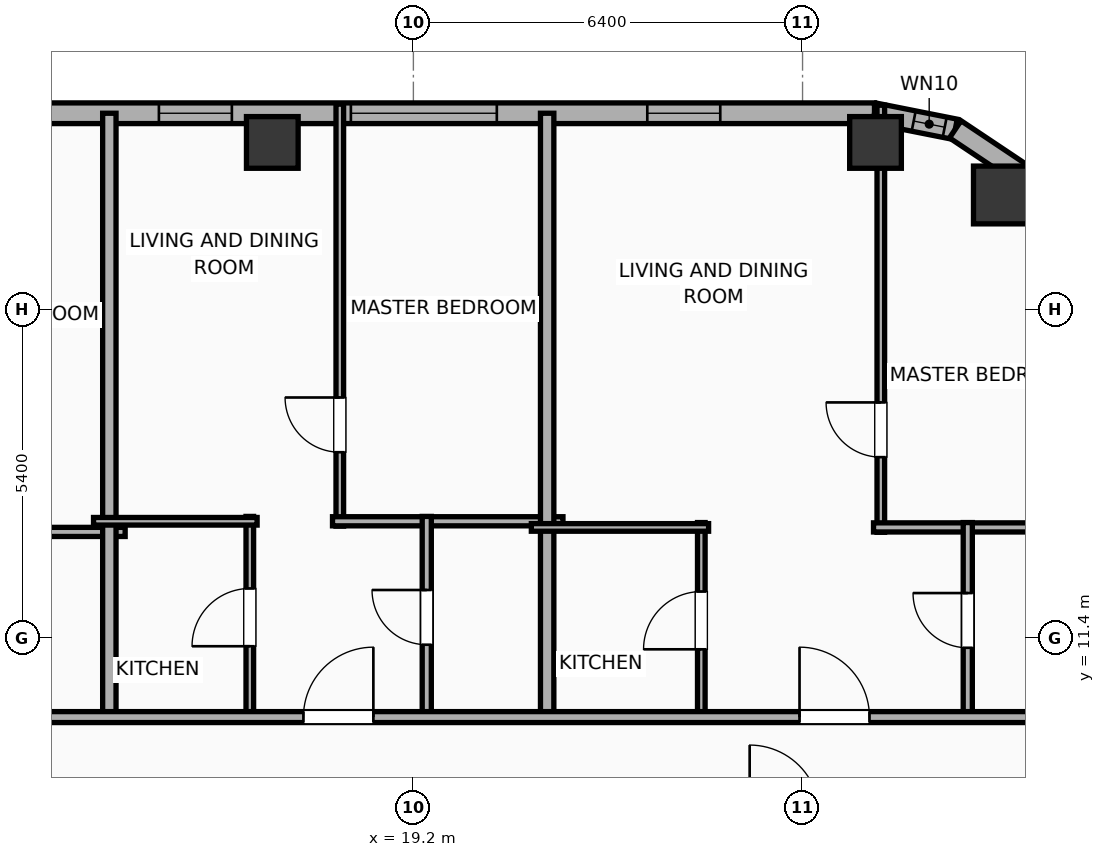
"""IFC4 building model, lengths in metres.
Left out: names, types, materials, properties, quantities, classifications, styles, units other than length and angle.
Written with IfcOpenShell. Run it as: python <this file> out.ifc"""

import sys

from ifc_helpers import new_model, si_unit, direction, frame, frame_2d, origin, origin_2d, place, context, subcontext, project, spatial, rectangle, hollow_rectangle, hollow_circle, extrude, element, fill, save


model = new_model("IFC4")
c1 = context("Model", 3, precision=1e-05, world=origin(), true_north=direction((0.0, 1.0)))
c2 = subcontext(c1, "Body", "Model", "MODEL_VIEW")
j1 = project(units=[si_unit("LENGTHUNIT", "METRE"), si_unit("PLANEANGLEUNIT", "RADIAN")], contexts=[c1])
p1 = place(None, origin())
s1 = spatial("IfcSite", under=j1, at=p1, CompositionType="ELEMENT")
p2 = place(p1, origin())
s2 = spatial("IfcBuilding", under=s1, at=p2, CompositionType="ELEMENT")
p3 = place(p2, frame((0.0, 0.0, 235.3)))
s3 = spatial("IfcBuildingStorey", under=s2, at=p3, CompositionType="ELEMENT", Elevation=235.3)
p4 = place(p3, frame((28.886, 18.686, 0.0), z_axis=(0.0, 0.0, 1.0), x_axis=(1.0, 0.0, 0.0)))
e1 = element("IfcColumn", 1, at=p4, inside=s3, PredefinedType="COLUMN", context=c2, shape_type="SweptSolid", body=[
    extrude(hollow_circle(Radius=0.475, WallThickness=0.032, at=origin_2d()), origin(), (0.0, 0.0, 1.0), 3.9),
])
for number, where, z_axis, x_axis in (
    (2, (26.8, 19.55, 0.0), (0.0, 0.0, 1.0), (1.0, 0.0, 0.0)),
    (3, (16.88, 19.55, 0.0), (0.0, 0.0, 1.0), (1.0, 0.0, 0.0)),
):
    element("IfcColumn", number, at=place(p3, frame(where, z_axis=z_axis, x_axis=x_axis)), inside=s3, PredefinedType="COLUMN", context=c2, shape_type="SweptSolid", body=[
        extrude(hollow_rectangle(XDim=0.85, YDim=0.85, WallThickness=0.028, at=origin_2d()), origin(), (0.0, 0.0, 1.0), 3.9),
    ])
p5 = place(p3, frame((-22.783, 20.03, 0.0), z_axis=(0.0, 0.0, 1.0), x_axis=(1.0, 0.0, 0.0)))
e4 = element("IfcWall", 4, at=p5, inside=s3, PredefinedType="ELEMENTEDWALL", context=c2, shape_type="SweptSolid", body=[
    extrude(rectangle(XDim=49.566, YDim=0.34, at=frame_2d((24.783, 0.0))), origin(), (0.0, 0.0, 1.0), 3.65),
])
p6 = place(p5, frame((23.583, 0.0, 0.75)))
e5 = element("IfcOpeningElement", 5, at=p6, cuts=e4, PredefinedType="OPENING", context=c2, shape_type="SweptSolid", body=[
    extrude(rectangle(XDim=2.4, YDim=2.1, at=frame_2d((1.2, 1.05))), frame((0.0, 0.18, 0.0), z_axis=(0.0, -1.0, 0.0), x_axis=(1.0, 0.0, 0.0)), (0.0, 0.0, 1.0), 0.36),
])
p7 = place(p5, frame((40.956, 0.0, 0.75)))
e6 = element("IfcOpeningElement", 6, at=p7, cuts=e4, PredefinedType="OPENING", context=c2, shape_type="SweptSolid", body=[
    extrude(rectangle(XDim=2.4, YDim=2.1, at=frame_2d((1.2, 1.05))), frame((0.0, 0.18, 0.0), z_axis=(0.0, -1.0, 0.0), x_axis=(1.0, 0.0, 0.0)), (0.0, 0.0, 1.0), 0.36),
])
p8 = place(p5, frame((5.078, 0.0, 0.75)))
e7 = element("IfcOpeningElement", 7, at=p8, cuts=e4, PredefinedType="OPENING", context=c2, shape_type="SweptSolid", body=[
    extrude(rectangle(XDim=1.2, YDim=2.05, at=frame_2d((0.6, 1.025))), frame((0.0, 0.18, 0.0), z_axis=(0.0, -1.0, 0.0), x_axis=(1.0, 0.0, 0.0)), (0.0, 0.0, 1.0), 0.36),
])
p9 = place(p5, frame((8.058, 0.0, 0.75)))
e8 = element("IfcOpeningElement", 8, at=p9, cuts=e4, PredefinedType="OPENING", context=c2, shape_type="SweptSolid", body=[
    extrude(rectangle(XDim=1.2, YDim=2.05, at=frame_2d((0.6, 1.025))), frame((0.0, 0.18, 0.0), z_axis=(0.0, -1.0, 0.0), x_axis=(1.0, 0.0, 0.0)), (0.0, 0.0, 1.0), 0.36),
])
p10 = place(p5, frame((12.478, 0.0, 0.75)))
e9 = element("IfcOpeningElement", 9, at=p10, cuts=e4, PredefinedType="OPENING", context=c2, shape_type="SweptSolid", body=[
    extrude(rectangle(XDim=1.2, YDim=2.05, at=frame_2d((0.6, 1.025))), frame((0.0, 0.18, 0.0), z_axis=(0.0, -1.0, 0.0), x_axis=(1.0, 0.0, 0.0)), (0.0, 0.0, 1.0), 0.36),
])
p11 = place(p5, frame((16.178, 0.0, 0.75)))
e10 = element("IfcOpeningElement", 10, at=p11, cuts=e4, PredefinedType="OPENING", context=c2, shape_type="SweptSolid", body=[
    extrude(rectangle(XDim=1.2, YDim=2.05, at=frame_2d((0.6, 1.025))), frame((0.0, 0.18, 0.0), z_axis=(0.0, -1.0, 0.0), x_axis=(1.0, 0.0, 0.0)), (0.0, 0.0, 1.0), 0.36),
])
p12 = place(p5, frame((20.478, 0.0, 0.75)))
e11 = element("IfcOpeningElement", 11, at=p12, cuts=e4, PredefinedType="OPENING", context=c2, shape_type="SweptSolid", body=[
    extrude(rectangle(XDim=1.2, YDim=2.05, at=frame_2d((0.6, 1.025))), frame((0.0, 0.18, 0.0), z_axis=(0.0, -1.0, 0.0), x_axis=(1.0, 0.0, 0.0)), (0.0, 0.0, 1.0), 0.36),
])
p13 = place(p5, frame((27.278, 0.0, 0.75)))
e12 = element("IfcOpeningElement", 12, at=p13, cuts=e4, PredefinedType="OPENING", context=c2, shape_type="SweptSolid", body=[
    extrude(rectangle(XDim=1.2, YDim=2.05, at=frame_2d((0.6, 1.025))), frame((0.0, 0.18, 0.0), z_axis=(0.0, -1.0, 0.0), x_axis=(1.0, 0.0, 0.0)), (0.0, 0.0, 1.0), 0.36),
])
p14 = place(p5, frame((30.978, 0.0, 0.75)))
e13 = element("IfcOpeningElement", 13, at=p14, cuts=e4, PredefinedType="OPENING", context=c2, shape_type="SweptSolid", body=[
    extrude(rectangle(XDim=1.2, YDim=2.05, at=frame_2d((0.6, 1.025))), frame((0.0, 0.18, 0.0), z_axis=(0.0, -1.0, 0.0), x_axis=(1.0, 0.0, 0.0)), (0.0, 0.0, 1.0), 0.36),
])
p15 = place(p5, frame((34.678, 0.0, 0.75)))
e14 = element("IfcOpeningElement", 14, at=p15, cuts=e4, PredefinedType="OPENING", context=c2, shape_type="SweptSolid", body=[
    extrude(rectangle(XDim=1.2, YDim=2.05, at=frame_2d((0.6, 1.025))), frame((0.0, 0.18, 0.0), z_axis=(0.0, -1.0, 0.0), x_axis=(1.0, 0.0, 0.0)), (0.0, 0.0, 1.0), 0.36),
])
p16 = place(p5, frame((37.798, 0.0, 0.75)))
e15 = element("IfcOpeningElement", 15, at=p16, cuts=e4, PredefinedType="OPENING", context=c2, shape_type="SweptSolid", body=[
    extrude(rectangle(XDim=1.2, YDim=2.05, at=frame_2d((0.6, 1.025))), frame((0.0, 0.18, 0.0), z_axis=(0.0, -1.0, 0.0), x_axis=(1.0, 0.0, 0.0)), (0.0, 0.0, 1.0), 0.36),
])
p17 = place(p5, frame((45.83, 0.0, 0.75)))
e16 = element("IfcOpeningElement", 16, at=p17, cuts=e4, PredefinedType="OPENING", context=c2, shape_type="SweptSolid", body=[
    extrude(rectangle(XDim=1.2, YDim=2.05, at=frame_2d((0.6, 1.025))), frame((0.0, 0.18, 0.0), z_axis=(0.0, -1.0, 0.0), x_axis=(1.0, 0.0, 0.0)), (0.0, 0.0, 1.0), 0.36),
])
p18 = place(p3, frame((26.783, 20.03, 0.0), z_axis=(0.0, 0.0, 1.0), x_axis=(0.980788153188, -0.195075878998, 0.0)))
e17 = element("IfcWall", 17, at=p18, inside=s3, PredefinedType="ELEMENTEDWALL", context=c2, shape_type="SweptSolid", body=[
    extrude(rectangle(XDim=1.354, YDim=0.34, at=frame_2d((0.677, 0.0))), origin(), (0.0, 0.0, 1.0), 3.65),
])
p19 = place(p18, frame((0.657, 0.0, 0.75)))
e18 = element("IfcOpeningElement", 18, at=p19, cuts=e17, PredefinedType="OPENING", context=c2, shape_type="SweptSolid", body=[
    extrude(rectangle(XDim=0.52, YDim=2.05, at=frame_2d((0.26, 1.025))), frame((0.0, 0.18, 0.0), z_axis=(0.0, -1.0, 0.0), x_axis=(1.0, 0.0, 0.0)), (0.0, 0.0, 1.0), 0.36),
])
for number, where, z_axis, x_axis in (
    (19, (28.111, 19.766, 0.0), (0.0, 0.0, 1.0), (0.831, -0.556, 0.0)),
    (20, (29.223, 19.023, 0.0), (0.0, 0.0, 1.0), (0.556, -0.831, 0.0)),
):
    element("IfcWall", number, at=place(p3, frame(where, z_axis=z_axis, x_axis=x_axis)), inside=s3, PredefinedType="ELEMENTEDWALL", context=c2, shape_type="SweptSolid", body=[
        extrude(rectangle(XDim=1.337, YDim=0.34, at=frame_2d((0.668, 0.0))), origin(), (0.0, 0.0, 1.0), 3.65),
    ])
p20 = place(p3, frame((10.67, 13.145, 0.0), z_axis=(0.0, 0.0, 1.0), x_axis=(1.0, 0.0, 0.0)))
e21 = element("IfcWall", 21, at=p20, inside=s3, PredefinedType="PLUMBINGWALL", context=c2, shape_type="SweptSolid", body=[
    extrude(rectangle(XDim=3.79, YDim=0.15, at=frame_2d((1.895, 0.0))), origin(), (0.0, 0.0, 1.0), 3.65),
])
p21 = place(p3, frame((14.2, 10.02, 0.0), z_axis=(0.0, 0.0, 1.0), x_axis=(0.0, 1.0, 0.0)))
e22 = element("IfcWall", 22, at=p21, inside=s3, PredefinedType="PARTITIONING", context=c2, shape_type="SweptSolid", body=[
    extrude(rectangle(XDim=10.01, YDim=0.22, at=frame_2d((5.005, 0.0))), origin(), (0.0, 0.0, 1.0), 3.65),
])
p22 = place(p3, frame((17.99, 13.24, 0.0), z_axis=(0.0, 0.0, 1.0), x_axis=(0.0, 1.0, 0.0)))
e23 = element("IfcWall", 23, at=p22, inside=s3, PredefinedType="PARTITIONING", context=c2, shape_type="SweptSolid", body=[
    extrude(rectangle(XDim=6.94, YDim=0.125, at=frame_2d((3.47, 0.0))), origin(), (0.0, 0.0, 1.0), 3.65),
])
p23 = place(p22, frame((1.216, 0.0, 0.0)))
e24 = element("IfcOpeningElement", 24, at=p23, cuts=e23, PredefinedType="OPENING", context=c2, shape_type="SweptSolid", body=[
    extrude(rectangle(XDim=0.9, YDim=2.05, at=frame_2d((0.45, 1.025))), frame((0.0, 0.073, 0.0), z_axis=(0.0, -1.0, 0.0), x_axis=(1.0, 0.0, 0.0)), (0.0, 0.0, 1.0), 0.145),
])
p24 = place(p3, frame((17.87, 13.32, 0.0), z_axis=(0.0, 0.0, 1.0), x_axis=(1.0, 0.0, 0.0)))
e25 = element("IfcWall", 25, at=p24, inside=s3, PredefinedType="PLUMBINGWALL", context=c2, shape_type="SweptSolid", body=[
    extrude(rectangle(XDim=3.79, YDim=0.15, at=frame_2d((1.895, 0.0))), origin(), (0.0, 0.0, 1.0), 3.65),
])
p25 = place(p3, frame((16.51, 10.08, 0.0), z_axis=(0.0, 0.0, 1.0), x_axis=(0.0, 1.0, 0.0)))
e26 = element("IfcWall", 26, at=p25, inside=s3, PredefinedType="PARTITIONING", context=c2, shape_type="SweptSolid", body=[
    extrude(rectangle(XDim=3.32, YDim=0.125, at=frame_2d((1.66, 0.0))), origin(), (0.0, 0.0, 1.0), 3.65),
])
p26 = place(p25, frame((1.185, 0.0, 0.0)))
e27 = element("IfcOpeningElement", 27, at=p26, cuts=e26, PredefinedType="OPENING", context=c2, shape_type="SweptSolid", body=[
    extrude(rectangle(XDim=0.95, YDim=2.05, at=frame_2d((0.475, 1.025))), frame((0.0, 0.073, 0.0), z_axis=(0.0, -1.0, 0.0), x_axis=(1.0, 0.0, 0.0)), (0.0, 0.0, 1.0), 0.145),
])
p27 = place(p3, frame((13.94, 13.32, 0.0), z_axis=(0.0, 0.0, 1.0), x_axis=(1.0, 0.0, 0.0)))
e28 = element("IfcWall", 28, at=p27, inside=s3, PredefinedType="PARTITIONING", context=c2, shape_type="SweptSolid", body=[
    extrude(rectangle(XDim=2.69, YDim=0.125, at=frame_2d((1.345, 0.0))), origin(), (0.0, 0.0, 1.0), 3.65),
])
p28 = place(p3, frame((19.42, 10.08, 0.0), z_axis=(0.0, 0.0, 1.0), x_axis=(0.0, 1.0, 0.0)))
e29 = element("IfcWall", 29, at=p28, inside=s3, PredefinedType="PLUMBINGWALL", context=c2, shape_type="SweptSolid", body=[
    extrude(rectangle(XDim=3.32, YDim=0.15, at=frame_2d((1.66, 0.0))), origin(), (0.0, 0.0, 1.0), 3.65),
])
p29 = place(p28, frame((1.21, 0.0, 0.0)))
e30 = element("IfcOpeningElement", 30, at=p29, cuts=e29, PredefinedType="OPENING", context=c2, shape_type="SweptSolid", body=[
    extrude(rectangle(XDim=0.9, YDim=2.05, at=frame_2d((0.45, 1.025))), frame((0.0, 0.085, 0.0), z_axis=(0.0, -1.0, 0.0), x_axis=(1.0, 0.0, 0.0)), (0.0, 0.0, 1.0), 0.17),
])
p30 = place(p3, frame((21.4, 10.02, 0.0), z_axis=(0.0, 0.0, 1.0), x_axis=(0.0, 1.0, 0.0)))
e31 = element("IfcWall", 31, at=p30, inside=s3, PredefinedType="PARTITIONING", context=c2, shape_type="SweptSolid", body=[
    extrude(rectangle(XDim=10.01, YDim=0.22, at=frame_2d((5.005, 0.0))), origin(), (0.0, 0.0, 1.0), 3.65),
])
p31 = place(p3, frame((26.887, 13.139, 0.0), z_axis=(0.0, 0.0, 1.0), x_axis=(0.0, 1.0, 0.0)))
e32 = element("IfcWall", 32, at=p31, inside=s3, PredefinedType="PARTITIONING", context=c2, shape_type="SweptSolid", body=[
    extrude(rectangle(XDim=7.023, YDim=0.125, at=frame_2d((3.512, 0.0))), origin(), (0.0, 0.0, 1.0), 3.65),
])
p32 = place(p31, frame((1.236, 0.0, 0.0)))
e33 = element("IfcOpeningElement", 33, at=p32, cuts=e32, PredefinedType="OPENING", context=c2, shape_type="SweptSolid", body=[
    extrude(rectangle(XDim=0.9, YDim=2.05, at=frame_2d((0.45, 1.025))), frame((0.0, 0.073, 0.0), z_axis=(0.0, -1.0, 0.0), x_axis=(1.0, 0.0, 0.0)), (0.0, 0.0, 1.0), 0.145),
])
p33 = place(p3, frame((26.767, 13.219, 0.0), z_axis=(0.0, 0.0, 1.0), x_axis=(1.0, 0.0, 0.0)))
e34 = element("IfcWall", 34, at=p33, inside=s3, PredefinedType="PLUMBINGWALL", context=c2, shape_type="SweptSolid", body=[
    extrude(rectangle(XDim=3.613, YDim=0.15, at=frame_2d((1.806, 0.0))), origin(), (0.0, 0.0, 1.0), 3.65),
])
p34 = place(p3, frame((23.935, 10.08, 0.0), z_axis=(0.0, 0.0, 1.0), x_axis=(0.0, 1.0, 0.0)))
e35 = element("IfcWall", 35, at=p34, inside=s3, PredefinedType="PARTITIONING", context=c2, shape_type="SweptSolid", body=[
    extrude(rectangle(XDim=3.219, YDim=0.125, at=frame_2d((1.609, 0.0))), origin(), (0.0, 0.0, 1.0), 3.65),
])
p35 = place(p34, frame((1.135, 0.0, 0.0)))
e36 = element("IfcOpeningElement", 36, at=p35, cuts=e35, PredefinedType="OPENING", context=c2, shape_type="SweptSolid", body=[
    extrude(rectangle(XDim=0.95, YDim=2.05, at=frame_2d((0.475, 1.025))), frame((0.0, 0.073, 0.0), z_axis=(0.0, -1.0, 0.0), x_axis=(1.0, 0.0, 0.0)), (0.0, 0.0, 1.0), 0.145),
])
p36 = place(p3, frame((21.14, 13.219, 0.0), z_axis=(0.0, 0.0, 1.0), x_axis=(1.0, 0.0, 0.0)))
e37 = element("IfcWall", 37, at=p36, inside=s3, PredefinedType="PARTITIONING", context=c2, shape_type="SweptSolid", body=[
    extrude(rectangle(XDim=2.915, YDim=0.125, at=frame_2d((1.458, 0.0))), origin(), (0.0, 0.0, 1.0), 3.65),
])
p37 = place(p3, frame((28.317, 10.08, 0.0), z_axis=(0.0, 0.0, 1.0), x_axis=(0.0, 1.0, 0.0)))
e38 = element("IfcWall", 38, at=p37, inside=s3, PredefinedType="PLUMBINGWALL", context=c2, shape_type="SweptSolid", body=[
    extrude(rectangle(XDim=3.219, YDim=0.15, at=frame_2d((1.609, 0.0))), origin(), (0.0, 0.0, 1.0), 3.65),
])
p38 = place(p37, frame((1.159, 0.0, 0.0)))
e39 = element("IfcOpeningElement", 39, at=p38, cuts=e38, PredefinedType="OPENING", context=c2, shape_type="SweptSolid", body=[
    extrude(rectangle(XDim=0.9, YDim=2.05, at=frame_2d((0.45, 1.025))), frame((0.0, 0.085, 0.0), z_axis=(0.0, -1.0, 0.0), x_axis=(1.0, 0.0, 0.0)), (0.0, 0.0, 1.0), 0.17),
])
p39 = place(p3, frame((-26.23, 10.1, 0.0), z_axis=(0.0, 0.0, 1.0), x_axis=(1.0, 0.0, 0.0)))
e40 = element("IfcWall", 40, at=p39, inside=s3, PredefinedType="PARTITIONING", context=c2, shape_type="SweptSolid", body=[
    extrude(rectangle(XDim=56.46, YDim=0.18, at=frame_2d((28.23, 0.0))), origin(), (0.0, 0.0, 1.0), 3.65),
])
p40 = place(p39, frame((5.302, 0.0, 0.0)))
e41 = element("IfcOpeningElement", 41, at=p40, cuts=e40, PredefinedType="OPENING", context=c2, shape_type="SweptSolid", body=[
    extrude(rectangle(XDim=1.15, YDim=2.05, at=frame_2d((0.575, 1.025))), frame((0.0, 0.1, 0.0), z_axis=(0.0, -1.0, 0.0), x_axis=(1.0, 0.0, 0.0)), (0.0, 0.0, 1.0), 0.2),
])
p41 = place(p39, frame((14.122, 0.0, 0.0)))
e42 = element("IfcOpeningElement", 42, at=p41, cuts=e40, PredefinedType="OPENING", context=c2, shape_type="SweptSolid", body=[
    extrude(rectangle(XDim=1.15, YDim=2.05, at=frame_2d((0.575, 1.025))), frame((0.0, 0.1, 0.0), z_axis=(0.0, -1.0, 0.0), x_axis=(1.0, 0.0, 0.0)), (0.0, 0.0, 1.0), 0.2),
])
p42 = place(p39, frame((21.518, 0.0, 0.0)))
e43 = element("IfcOpeningElement", 43, at=p42, cuts=e40, PredefinedType="OPENING", context=c2, shape_type="SweptSolid", body=[
    extrude(rectangle(XDim=1.15, YDim=2.05, at=frame_2d((0.575, 1.025))), frame((0.0, 0.1, 0.0), z_axis=(0.0, -1.0, 0.0), x_axis=(1.0, 0.0, 0.0)), (0.0, 0.0, 1.0), 0.2),
])
p43 = place(p39, frame((28.92, 0.0, 0.0)))
e44 = element("IfcOpeningElement", 44, at=p43, cuts=e40, PredefinedType="OPENING", context=c2, shape_type="SweptSolid", body=[
    extrude(rectangle(XDim=1.15, YDim=2.05, at=frame_2d((0.575, 1.025))), frame((0.0, 0.1, 0.0), z_axis=(0.0, -1.0, 0.0), x_axis=(1.0, 0.0, 0.0)), (0.0, 0.0, 1.0), 0.2),
])
p44 = place(p39, frame((36.322, 0.0, 0.0)))
e45 = element("IfcOpeningElement", 45, at=p44, cuts=e40, PredefinedType="OPENING", context=c2, shape_type="SweptSolid", body=[
    extrude(rectangle(XDim=1.15, YDim=2.05, at=frame_2d((0.575, 1.025))), frame((0.0, 0.1, 0.0), z_axis=(0.0, -1.0, 0.0), x_axis=(1.0, 0.0, 0.0)), (0.0, 0.0, 1.0), 0.2),
])
p45 = place(p39, frame((43.622, 0.0, 0.0)))
e46 = element("IfcOpeningElement", 46, at=p45, cuts=e40, PredefinedType="OPENING", context=c2, shape_type="SweptSolid", body=[
    extrude(rectangle(XDim=1.15, YDim=2.05, at=frame_2d((0.575, 1.025))), frame((0.0, 0.1, 0.0), z_axis=(0.0, -1.0, 0.0), x_axis=(1.0, 0.0, 0.0)), (0.0, 0.0, 1.0), 0.2),
])
p46 = place(p39, frame((51.781, 0.0, 0.0)))
e47 = element("IfcOpeningElement", 47, at=p46, cuts=e40, PredefinedType="OPENING", context=c2, shape_type="SweptSolid", body=[
    extrude(rectangle(XDim=1.15, YDim=2.05, at=frame_2d((0.575, 1.025))), frame((0.0, 0.1, 0.0), z_axis=(0.0, -1.0, 0.0), x_axis=(1.0, 0.0, 0.0)), (0.0, 0.0, 1.0), 0.2),
])
p47 = place(p7, origin())
e48 = element("IfcWindow", 48, at=p47, inside=s3, PartitioningType="SINGLE_PANEL", PredefinedType="WINDOW", context=c2, shape_type="SweptSolid", body=[
    extrude(rectangle(XDim=2.4, YDim=2.1, at=frame_2d((1.2, 1.05))), frame((0.0, 0.03, 0.0), z_axis=(0.0, -1.0, 0.0), x_axis=(1.0, 0.0, 0.0)), (0.0, 0.0, 1.0), 0.06),
])
fill(e6, e48)
p48 = place(p16, origin())
e49 = element("IfcWindow", 49, at=p48, inside=s3, PartitioningType="SINGLE_PANEL", PredefinedType="WINDOW", context=c2, shape_type="SweptSolid", body=[
    extrude(rectangle(XDim=1.2, YDim=2.05, at=frame_2d((0.6, 1.025))), frame((0.0, 0.03, 0.0), z_axis=(0.0, -1.0, 0.0), x_axis=(1.0, 0.0, 0.0)), (0.0, 0.0, 1.0), 0.06),
])
fill(e15, e49)
p49 = place(p17, origin())
e50 = element("IfcWindow", 50, at=p49, inside=s3, PartitioningType="SINGLE_PANEL", PredefinedType="WINDOW", context=c2, shape_type="SweptSolid", body=[
    extrude(rectangle(XDim=1.2, YDim=2.05, at=frame_2d((0.6, 1.025))), frame((0.0, 0.03, 0.0), z_axis=(0.0, -1.0, 0.0), x_axis=(1.0, 0.0, 0.0)), (0.0, 0.0, 1.0), 0.06),
])
fill(e16, e50)
p50 = place(p19, origin())
e51 = element("IfcWindow", 51, at=p50, inside=s3, PartitioningType="SINGLE_PANEL", PredefinedType="WINDOW", context=c2, shape_type="SweptSolid", body=[
    extrude(rectangle(XDim=0.52, YDim=2.05, at=frame_2d((0.26, 1.025))), frame((0.0, 0.03, 0.0), z_axis=(0.0, -1.0, 0.0), x_axis=(1.0, 0.0, 0.0)), (0.0, 0.0, 1.0), 0.06),
])
fill(e18, e51)
p51 = place(p23, origin())
e52 = element("IfcDoor", 52, at=p51, inside=s3, OperationType="SINGLE_SWING_RIGHT", PredefinedType="DOOR", context=c2, shape_type="SweptSolid", body=[
    extrude(rectangle(XDim=0.9, YDim=2.05, at=frame_2d((0.45, 1.025))), frame((0.0, 0.025, 0.0), z_axis=(0.0, -1.0, 0.0), x_axis=(1.0, 0.0, 0.0)), (0.0, 0.0, 1.0), 0.05),
])
fill(e24, e52)
p52 = place(p26, origin())
e53 = element("IfcDoor", 53, at=p52, inside=s3, OperationType="SINGLE_SWING_LEFT", PredefinedType="DOOR", context=c2, shape_type="SweptSolid", body=[
    extrude(rectangle(XDim=0.95, YDim=2.05, at=frame_2d((0.475, 1.025))), frame((0.0, 0.025, 0.0), z_axis=(0.0, -1.0, 0.0), x_axis=(1.0, 0.0, 0.0)), (0.0, 0.0, 1.0), 0.05),
])
fill(e27, e53)
p53 = place(p29, origin())
e54 = element("IfcDoor", 54, at=p53, inside=s3, OperationType="SINGLE_SWING_RIGHT", PredefinedType="DOOR", context=c2, shape_type="SweptSolid", body=[
    extrude(rectangle(XDim=0.9, YDim=2.05, at=frame_2d((0.45, 1.025))), frame((0.0, 0.025, 0.0), z_axis=(0.0, -1.0, 0.0), x_axis=(1.0, 0.0, 0.0)), (0.0, 0.0, 1.0), 0.05),
])
fill(e30, e54)
p54 = place(p32, origin())
e55 = element("IfcDoor", 55, at=p54, inside=s3, OperationType="SINGLE_SWING_RIGHT", PredefinedType="DOOR", context=c2, shape_type="SweptSolid", body=[
    extrude(rectangle(XDim=0.9, YDim=2.05, at=frame_2d((0.45, 1.025))), frame((0.0, 0.025, 0.0), z_axis=(0.0, -1.0, 0.0), x_axis=(1.0, 0.0, 0.0)), (0.0, 0.0, 1.0), 0.05),
])
fill(e33, e55)
p55 = place(p35, origin())
e56 = element("IfcDoor", 56, at=p55, inside=s3, OperationType="SINGLE_SWING_LEFT", PredefinedType="DOOR", context=c2, shape_type="SweptSolid", body=[
    extrude(rectangle(XDim=0.95, YDim=2.05, at=frame_2d((0.475, 1.025))), frame((0.0, 0.025, 0.0), z_axis=(0.0, -1.0, 0.0), x_axis=(1.0, 0.0, 0.0)), (0.0, 0.0, 1.0), 0.05),
])
fill(e36, e56)
p56 = place(p38, origin())
e57 = element("IfcDoor", 57, at=p56, inside=s3, OperationType="SINGLE_SWING_RIGHT", PredefinedType="DOOR", context=c2, shape_type="SweptSolid", body=[
    extrude(rectangle(XDim=0.9, YDim=2.05, at=frame_2d((0.45, 1.025))), frame((0.0, 0.025, 0.0), z_axis=(0.0, -1.0, 0.0), x_axis=(1.0, 0.0, 0.0)), (0.0, 0.0, 1.0), 0.05),
])
fill(e39, e57)
p57 = place(p45, origin())
e58 = element("IfcDoor", 58, at=p57, inside=s3, OperationType="SINGLE_SWING_RIGHT", PredefinedType="DOOR", context=c2, shape_type="SweptSolid", body=[
    extrude(rectangle(XDim=1.15, YDim=2.05, at=frame_2d((0.575, 1.025))), frame((0.0, 0.025, 0.0), z_axis=(0.0, -1.0, 0.0), x_axis=(1.0, 0.0, 0.0)), (0.0, 0.0, 1.0), 0.05),
])
fill(e46, e58)
p58 = place(p46, origin())
e59 = element("IfcDoor", 59, at=p58, inside=s3, OperationType="SINGLE_SWING_LEFT", PredefinedType="DOOR", context=c2, shape_type="SweptSolid", body=[
    extrude(rectangle(XDim=1.15, YDim=2.05, at=frame_2d((0.575, 1.025))), frame((0.0, 0.025, 0.0), z_axis=(0.0, -1.0, 0.0), x_axis=(1.0, 0.0, 0.0)), (0.0, 0.0, 1.0), 0.05),
])
fill(e47, e59)
save(model, sys.argv[1])
